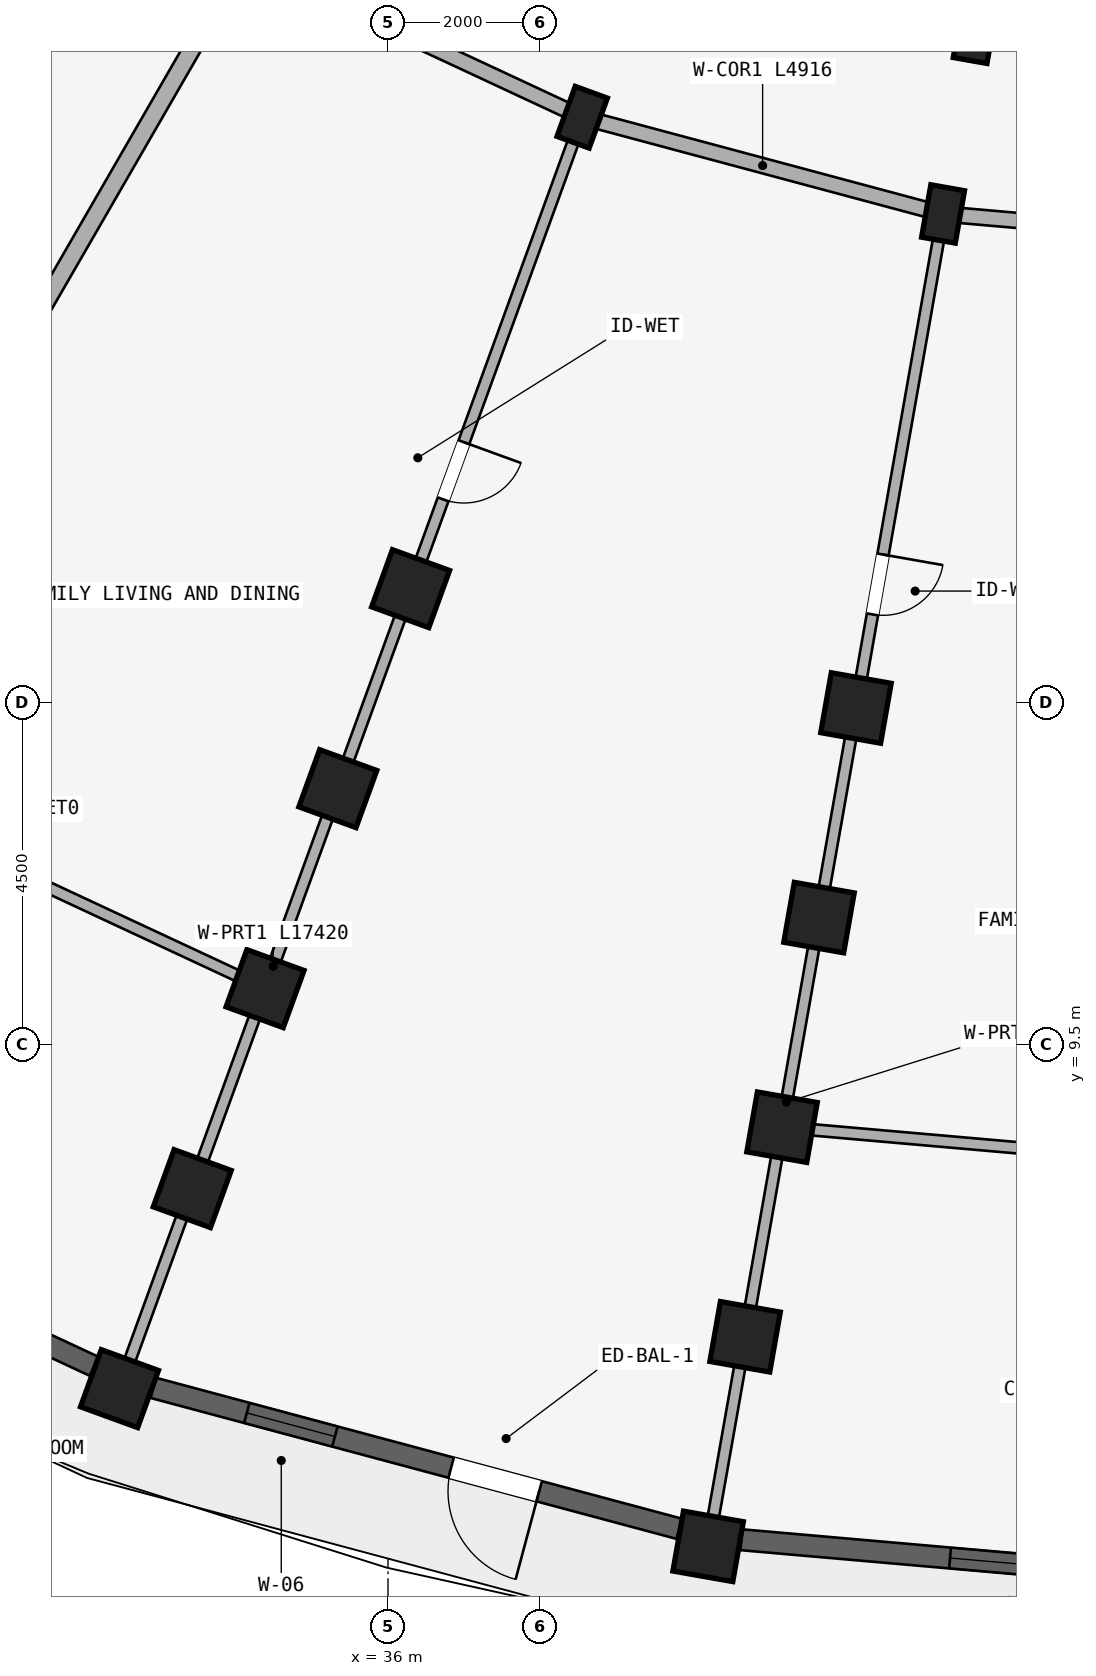
"""IFC4 building model, lengths in metres.
Left out: names, types, materials, properties, quantities, classifications, styles, units other than length and angle.
Written with IfcOpenShell. Run it as: python <this file> out.ifc"""

import sys

from ifc_helpers import new_model, si_unit, direction, frame, frame_2d, origin, origin_2d, place, context, subcontext, project, spatial, rectangle, extrude, element, fill, save


model = new_model("IFC4")
c1 = context("Model", 3, precision=1e-05, world=origin(), true_north=direction((0.0, 1.0)))
c2 = subcontext(c1, "Body", "Model", "MODEL_VIEW")
j1 = project(units=[si_unit("LENGTHUNIT", "METRE"), si_unit("PLANEANGLEUNIT", "RADIAN")], contexts=[c1])
p1 = place(None, origin())
s1 = spatial("IfcSite", under=j1, at=p1, CompositionType="ELEMENT")
p2 = place(p1, origin())
s2 = spatial("IfcBuilding", under=s1, at=p2, CompositionType="ELEMENT")
p3 = place(p2, frame((0.0, 0.0, 11.85)))
s3 = spatial("IfcBuildingStorey", under=s2, at=p3, CompositionType="ELEMENT", Elevation=11.85)
for number, where, z_axis, x_axis in (
    (1, (43.72, 22.792, 0.0), (0.0, 0.0, 1.0), (-0.985, 0.174, 0.0)),
    (2, (43.303, 20.428, 0.0), (0.0, 0.0, 1.0), (-0.985, 0.174, 0.0)),
):
    element("IfcColumn", number, at=place(p3, frame(where, z_axis=z_axis, x_axis=x_axis)), inside=s3, PredefinedType="COLUMN", context=c2, shape_type="SweptSolid", body=[
        extrude(rectangle(XDim=0.45, YDim=0.7, at=origin_2d()), origin(), (0.0, 0.0, 1.0), 2.93),
    ])
for number, where, z_axis, x_axis in (
    (3, (42.157, 13.929, 0.0), (0.0, 0.0, 1.0), (-0.985, 0.174, 0.0)),
    (4, (41.671, 11.171, 0.0), (0.0, 0.0, 1.0), (-0.985, 0.174, 0.0)),
    (5, (41.185, 8.414, 0.0), (0.0, 0.0, 1.0), (-0.985, 0.174, 0.0)),
    (6, (40.698, 5.656, 0.0), (0.0, 0.0, 1.0), (-0.985, 0.174, 0.0)),
    (7, (40.212, 2.899, 0.0), (0.0, 0.0, 1.0), (-0.985, 0.174, 0.0)),
):
    element("IfcColumn", number, at=place(p3, frame(where, z_axis=z_axis, x_axis=x_axis)), inside=s3, PredefinedType="COLUMN", context=c2, shape_type="SweptSolid", body=[
        extrude(rectangle(XDim=0.8, YDim=0.8, at=origin_2d()), origin(), (0.0, 0.0, 1.0), 2.93),
    ])
p4 = place(p3, frame((38.555, 21.701, 0.0), z_axis=(0.0, 0.0, 1.0), x_axis=(-0.939692620786, 0.342020143326, 0.0)))
e8 = element("IfcColumn", 8, at=p4, inside=s3, PredefinedType="COLUMN", context=c2, shape_type="SweptSolid", body=[
    extrude(rectangle(XDim=0.45, YDim=0.7, at=origin_2d()), origin(), (0.0, 0.0, 1.0), 2.93),
])
for number, where, z_axis, x_axis in (
    (9, (36.298, 15.499, 0.0), (0.0, 0.0, 1.0), (-0.94, 0.342, 0.0)),
    (10, (35.34, 12.868, 0.0), (0.0, 0.0, 1.0), (-0.94, 0.342, 0.0)),
    (11, (34.382, 10.236, 0.0), (0.0, 0.0, 1.0), (-0.94, 0.342, 0.0)),
    (12, (33.425, 7.605, 0.0), (0.0, 0.0, 1.0), (-0.94, 0.342, 0.0)),
    (13, (32.467, 4.974, 0.0), (0.0, 0.0, 1.0), (-0.94, 0.342, 0.0)),
):
    element("IfcColumn", number, at=place(p3, frame(where, z_axis=z_axis, x_axis=x_axis)), inside=s3, PredefinedType="COLUMN", context=c2, shape_type="SweptSolid", body=[
        extrude(rectangle(XDim=0.8, YDim=0.8, at=origin_2d()), origin(), (0.0, 0.0, 1.0), 2.93),
    ])
p5 = place(p3, frame((48.2, 22.4, 0.0), z_axis=(0.0, 0.0, 1.0), x_axis=(-0.996191949488, 0.087187153726, 0.0)))
e14 = element("IfcWall", 14, at=p5, inside=s3, PredefinedType="STANDARD", context=c2, shape_type="SweptSolid", body=[
    extrude(rectangle(XDim=4.497, YDim=0.2, at=frame_2d((2.249, 0.0))), origin(), (0.0, 0.0, 1.0), 2.372),
])
p6 = place(p5, frame((1.729, 0.0, 0.0)))
e15 = element("IfcOpeningElement", 15, at=p6, cuts=e14, PredefinedType="OPENING", context=c2, shape_type="SweptSolid", body=[
    extrude(rectangle(XDim=1.04, YDim=2.15, at=frame_2d((0.52, 1.075))), frame((0.0, 0.11, 0.0), z_axis=(0.0, -1.0, 0.0), x_axis=(1.0, 0.0, 0.0)), (0.0, 0.0, 1.0), 0.22),
])
p7 = place(p3, frame((48.2, 20.0, 0.0), z_axis=(0.0, 0.0, 1.0), x_axis=(-0.996193663584, 0.087167566415, 0.0)))
e16 = element("IfcWall", 16, at=p7, inside=s3, PredefinedType="STANDARD", context=c2, shape_type="SweptSolid", body=[
    extrude(rectangle(XDim=4.916, YDim=0.2, at=frame_2d((2.458, 0.0))), origin(), (0.0, 0.0, 1.0), 2.372),
])
p8 = place(p7, frame((1.938, 0.0, 0.0)))
e17 = element("IfcOpeningElement", 17, at=p8, cuts=e16, PredefinedType="OPENING", context=c2, shape_type="SweptSolid", body=[
    extrude(rectangle(XDim=1.04, YDim=2.15, at=frame_2d((0.52, 1.075))), frame((0.0, 0.11, 0.0), z_axis=(0.0, -1.0, 0.0), x_axis=(1.0, 0.0, 0.0)), (0.0, 0.0, 1.0), 0.22),
])
p9 = place(p3, frame((43.303, 20.428, 0.0), z_axis=(0.0, 0.0, 1.0), x_axis=(-0.965930095386, 0.258803112091, 0.0)))
e18 = element("IfcWall", 18, at=p9, inside=s3, PredefinedType="STANDARD", context=c2, shape_type="SweptSolid", body=[
    extrude(rectangle(XDim=4.916, YDim=0.2, at=frame_2d((2.458, 0.0))), origin(), (0.0, 0.0, 1.0), 2.372),
])
p10 = place(p3, frame((38.555, 21.701, 0.0), z_axis=(0.0, 0.0, 1.0), x_axis=(-0.906302381024, 0.422629854778, 0.0)))
e19 = element("IfcWall", 19, at=p10, inside=s3, PredefinedType="STANDARD", context=c2, shape_type="SweptSolid", body=[
    extrude(rectangle(XDim=4.915, YDim=0.2, at=frame_2d((2.458, 0.0))), origin(), (0.0, 0.0, 1.0), 2.372),
])
p11 = place(p3, frame((43.286, 20.33, 0.0), z_axis=(0.0, 0.0, 1.0), x_axis=(-0.173646216546, -0.984808098809, 0.0)))
e20 = element("IfcWall", 20, at=p11, inside=s3, PredefinedType="PARTITIONING", context=c2, shape_type="SweptSolid", body=[
    extrude(rectangle(XDim=17.42, YDim=0.15, at=frame_2d((8.71, 0.0))), origin(), (0.0, 0.0, 1.0), 2.372),
])
p12 = place(p11, frame((4.45, 0.0, 0.0)))
e21 = element("IfcOpeningElement", 21, at=p12, cuts=e20, PredefinedType="OPENING", context=c2, shape_type="SweptSolid", body=[
    extrude(rectangle(XDim=0.8, YDim=2.1, at=frame_2d((0.4, 1.05))), frame((0.0, 0.085, 0.0), z_axis=(0.0, -1.0, 0.0), x_axis=(1.0, 0.0, 0.0)), (0.0, 0.0, 1.0), 0.17),
])
p13 = place(p3, frame((38.521, 21.607, 0.0), z_axis=(0.0, 0.0, 1.0), x_axis=(-0.342022120477, -0.939691901159, 0.0)))
e22 = element("IfcWall", 22, at=p13, inside=s3, PredefinedType="PARTITIONING", context=c2, shape_type="SweptSolid", body=[
    extrude(rectangle(XDim=17.42, YDim=0.15, at=frame_2d((8.71, 0.0))), origin(), (0.0, 0.0, 1.0), 2.372),
])
p14 = place(p13, frame((4.45, 0.0, 0.0)))
e23 = element("IfcOpeningElement", 23, at=p14, cuts=e22, PredefinedType="OPENING", context=c2, shape_type="SweptSolid", body=[
    extrude(rectangle(XDim=0.8, YDim=2.1, at=frame_2d((0.4, 1.05))), frame((0.0, 0.085, 0.0), z_axis=(0.0, -1.0, 0.0), x_axis=(1.0, 0.0, 0.0)), (0.0, 0.0, 1.0), 0.17),
])
p15 = place(p3, frame((34.05, 23.691, 0.0), z_axis=(0.0, 0.0, 1.0), x_axis=(-0.499997843263, -0.866026648973, 0.0)))
e24 = element("IfcWall", 24, at=p15, inside=s3, PredefinedType="STANDARD", context=c2, shape_type="SweptSolid", body=[
    extrude(rectangle(XDim=17.42, YDim=0.23, at=frame_2d((8.71, 0.0))), origin(), (0.0, 0.0, 1.0), 2.372),
])
p16 = place(p3, frame((48.2, 7.8, 0.0), z_axis=(0.0, 0.0, 1.0), x_axis=(-0.996194658198, 0.087156198737, 0.0)))
e25 = element("IfcWall", 25, at=p16, inside=s3, PredefinedType="PLUMBINGWALL", context=c2, shape_type="SweptSolid", body=[
    extrude(rectangle(XDim=7.042, YDim=0.15, at=frame_2d((3.521, 0.0))), origin(), (0.0, 0.0, 1.0), 2.372),
])
p17 = place(p16, frame((3.121, 0.0, 0.0)))
e26 = element("IfcOpeningElement", 26, at=p17, cuts=e25, PredefinedType="OPENING", context=c2, shape_type="SweptSolid", body=[
    extrude(rectangle(XDim=0.8, YDim=2.1, at=frame_2d((0.4, 1.05))), frame((0.0, 0.085, 0.0), z_axis=(0.0, -1.0, 0.0), x_axis=(1.0, 0.0, 0.0)), (0.0, 0.0, 1.0), 0.17),
])
p18 = place(p3, frame((34.382, 10.236, 0.0), z_axis=(0.0, 0.0, 1.0), x_axis=(-0.906297360311, 0.422640621205, 0.0)))
e27 = element("IfcWall", 27, at=p18, inside=s3, PredefinedType="PLUMBINGWALL", context=c2, shape_type="SweptSolid", body=[
    extrude(rectangle(XDim=7.042, YDim=0.15, at=frame_2d((3.521, 0.0))), origin(), (0.0, 0.0, 1.0), 2.372),
])
p19 = place(p18, frame((3.141, 0.0, 0.0)))
e28 = element("IfcOpeningElement", 28, at=p19, cuts=e27, PredefinedType="OPENING", context=c2, shape_type="SweptSolid", body=[
    extrude(rectangle(XDim=0.76, YDim=2.05, at=frame_2d((0.38, 1.025))), frame((0.0, 0.085, 0.0), z_axis=(0.0, -1.0, 0.0), x_axis=(1.0, 0.0, 0.0)), (0.0, 0.0, 1.0), 0.17),
])
p20 = place(p3, frame((47.785, 2.362, 0.0), z_axis=(0.0, 0.0, 1.0), x_axis=(-0.99619608453, 0.08713989423, 0.0)))
e29 = element("IfcWall", 29, at=p20, inside=s3, PredefinedType="STANDARD", context=c2, shape_type="SweptSolid", body=[
    extrude(rectangle(XDim=7.164, YDim=0.275, at=frame_2d((3.582, 0.0))), origin(), (0.0, 0.0, 1.0), 2.372),
])
p21 = place(p20, frame((2.757, 0.0, 0.422)))
e30 = element("IfcOpeningElement", 30, at=p21, cuts=e29, PredefinedType="OPENING", context=c2, shape_type="SweptSolid", body=[
    extrude(rectangle(XDim=1.65, YDim=1.75, at=frame_2d((0.825, 0.875))), frame((0.0, 0.147, 0.0), z_axis=(0.0, -1.0, 0.0), x_axis=(1.0, 0.0, 0.0)), (0.0, 0.0, 1.0), 0.295),
])
p22 = place(p3, frame((39.832, 3.13, 0.0), z_axis=(0.0, 0.0, 1.0), x_axis=(-0.965923712619, 0.258826933296, 0.0)))
e31 = element("IfcWall", 31, at=p22, inside=s3, PredefinedType="STANDARD", context=c2, shape_type="SweptSolid", body=[
    extrude(rectangle(XDim=7.164, YDim=0.275, at=frame_2d((3.582, 0.0))), origin(), (0.0, 0.0, 1.0), 2.372),
])
p23 = place(p22, frame((4.69, 0.0, 0.522)))
e32 = element("IfcOpeningElement", 32, at=p23, cuts=e31, PredefinedType="OPENING", context=c2, shape_type="SweptSolid", body=[
    extrude(rectangle(XDim=1.2, YDim=1.5, at=frame_2d((0.6, 0.75))), frame((0.0, 0.147, 0.0), z_axis=(0.0, -1.0, 0.0), x_axis=(1.0, 0.0, 0.0)), (0.0, 0.0, 1.0), 0.295),
])
p24 = place(p22, frame((1.907, 0.0, 0.0)))
e33 = element("IfcOpeningElement", 33, at=p24, cuts=e31, PredefinedType="OPENING", context=c2, shape_type="SweptSolid", body=[
    extrude(rectangle(XDim=1.2, YDim=2.15, at=frame_2d((0.6, 1.075))), frame((0.0, 0.147, 0.0), z_axis=(0.0, -1.0, 0.0), x_axis=(1.0, 0.0, 0.0)), (0.0, 0.0, 1.0), 0.295),
])
p25 = place(p3, frame((32.133, 5.268, 0.0), z_axis=(0.0, 0.0, 1.0), x_axis=(-0.906300636296, 0.422633596215, 0.0)))
e34 = element("IfcWall", 34, at=p25, inside=s3, PredefinedType="STANDARD", context=c2, shape_type="SweptSolid", body=[
    extrude(rectangle(XDim=7.164, YDim=0.275, at=frame_2d((3.582, 0.0))), origin(), (0.0, 0.0, 1.0), 2.372),
])
p26 = place(p25, frame((2.532, 0.0, 0.372)))
e35 = element("IfcOpeningElement", 35, at=p26, cuts=e34, PredefinedType="OPENING", context=c2, shape_type="SweptSolid", body=[
    extrude(rectangle(XDim=2.1, YDim=1.8, at=frame_2d((1.05, 0.9))), frame((0.0, 0.147, 0.0), z_axis=(0.0, -1.0, 0.0), x_axis=(1.0, 0.0, 0.0)), (0.0, 0.0, 1.0), 0.295),
])
p27 = place(p21, origin())
e36 = element("IfcWindow", 36, at=p27, inside=s3, PartitioningType="DOUBLE_PANEL_VERTICAL", PredefinedType="WINDOW", context=c2, shape_type="SweptSolid", body=[
    extrude(rectangle(XDim=1.65, YDim=1.75, at=frame_2d((0.825, 0.875))), frame((0.0, 0.03, 0.0), z_axis=(0.0, -1.0, 0.0), x_axis=(1.0, 0.0, 0.0)), (0.0, 0.0, 1.0), 0.06),
])
fill(e30, e36)
p28 = place(p23, origin())
e37 = element("IfcWindow", 37, at=p28, inside=s3, PartitioningType="SINGLE_PANEL", PredefinedType="WINDOW", context=c2, shape_type="SweptSolid", body=[
    extrude(rectangle(XDim=1.2, YDim=1.5, at=frame_2d((0.6, 0.75))), frame((0.0, 0.03, 0.0), z_axis=(0.0, -1.0, 0.0), x_axis=(1.0, 0.0, 0.0)), (0.0, 0.0, 1.0), 0.06),
])
fill(e32, e37)
p29 = place(p12, frame((0.8, 0.0, 0.0), z_axis=(0.0, 0.0, 1.0), x_axis=(-1.0, 0.0, 0.0)))
e38 = element("IfcDoor", 38, at=p29, inside=s3, OperationType="SINGLE_SWING_RIGHT", PredefinedType="DOOR", context=c2, shape_type="SweptSolid", body=[
    extrude(rectangle(XDim=0.8, YDim=2.1, at=frame_2d((0.4, 1.05))), frame((0.0, 0.025, 0.0), z_axis=(0.0, -1.0, 0.0), x_axis=(1.0, 0.0, 0.0)), (0.0, 0.0, 1.0), 0.05),
])
fill(e21, e38)
p30 = place(p14, origin())
e39 = element("IfcDoor", 39, at=p30, inside=s3, OperationType="SINGLE_SWING_LEFT", PredefinedType="DOOR", context=c2, shape_type="SweptSolid", body=[
    extrude(rectangle(XDim=0.8, YDim=2.1, at=frame_2d((0.4, 1.05))), frame((0.0, 0.025, 0.0), z_axis=(0.0, -1.0, 0.0), x_axis=(1.0, 0.0, 0.0)), (0.0, 0.0, 1.0), 0.05),
])
fill(e23, e39)
p31 = place(p24, origin())
e40 = element("IfcDoor", 40, at=p31, inside=s3, OperationType="SINGLE_SWING_LEFT", PredefinedType="DOOR", context=c2, shape_type="SweptSolid", body=[
    extrude(rectangle(XDim=1.2, YDim=2.15, at=frame_2d((0.6, 1.075))), frame((0.0, 0.025, 0.0), z_axis=(0.0, -1.0, 0.0), x_axis=(1.0, 0.0, 0.0)), (0.0, 0.0, 1.0), 0.05),
])
fill(e33, e40)
save(model, sys.argv[1])
